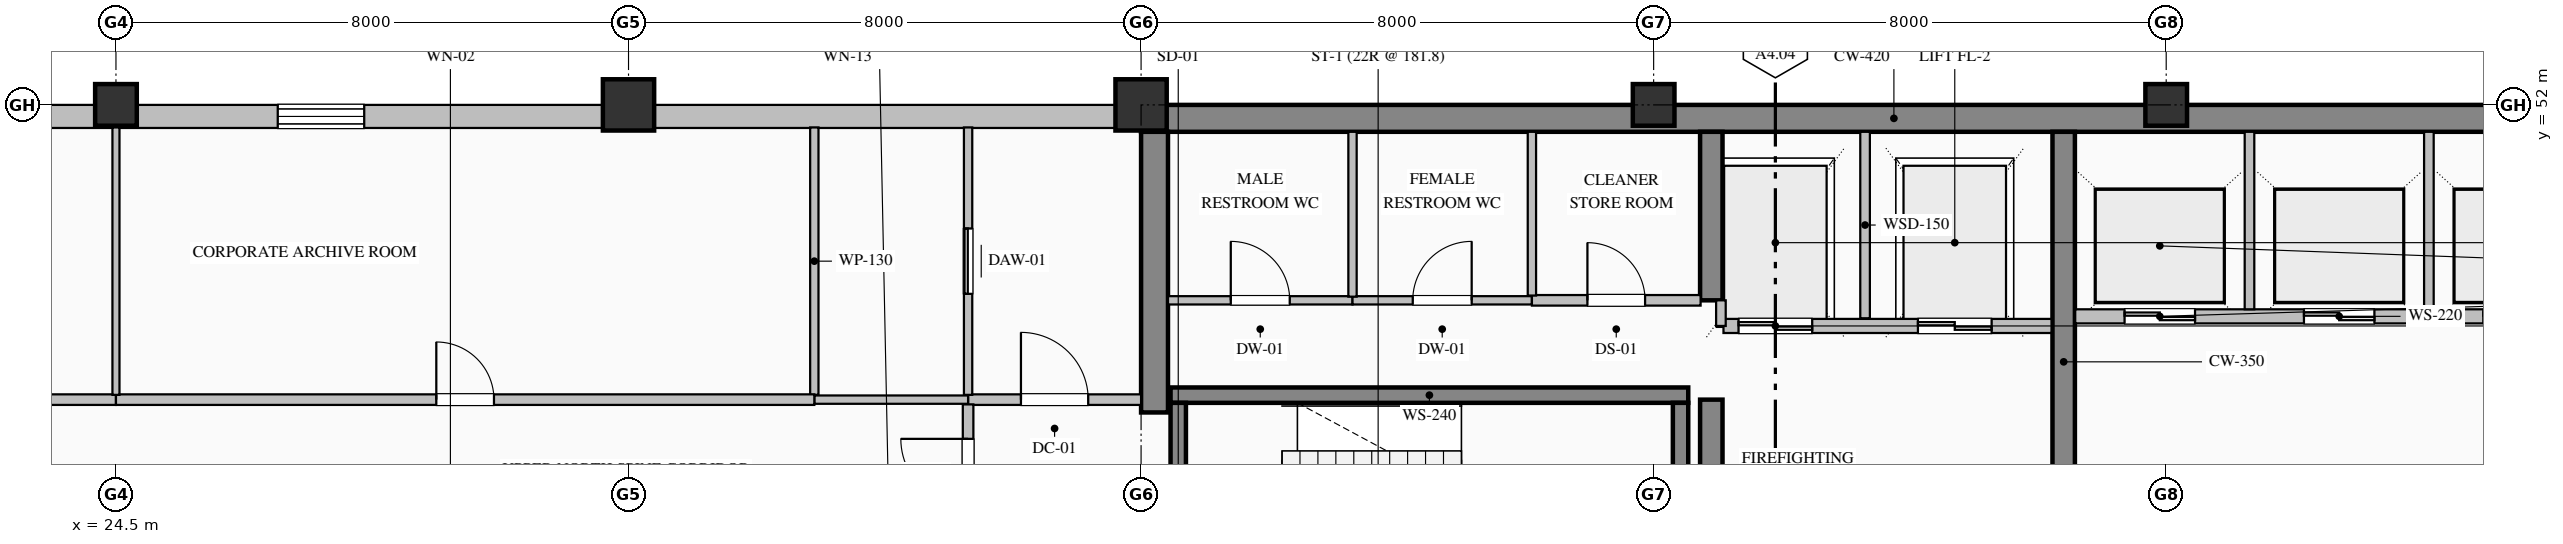
"""IFC4 building model, lengths in metres.
Left out: names, types, materials, properties, quantities, classifications, styles, units other than length and angle.
Written with IfcOpenShell. Run it as: python <this file> out.ifc"""

import sys

from ifc_helpers import new_model, si_unit, direction, frame, frame_2d, origin, origin_2d, place, context, subcontext, project, spatial, rectangle, hollow_rectangle, extrude, element, fill, save


model = new_model("IFC4")
c1 = context("Model", 3, precision=1e-05, world=origin(), true_north=direction((0.0, 1.0)))
c2 = subcontext(c1, "Body", "Model", "MODEL_VIEW")
j1 = project(units=[si_unit("LENGTHUNIT", "METRE"), si_unit("PLANEANGLEUNIT", "RADIAN")], contexts=[c1])
p1 = place(None, origin())
s1 = spatial("IfcSite", under=j1, at=p1, CompositionType="ELEMENT")
p2 = place(p1, origin())
s2 = spatial("IfcBuilding", under=s1, at=p2, CompositionType="ELEMENT")
p3 = place(p2, frame((0.0, 0.0, 319.2)))
s3 = spatial("IfcBuildingStorey", under=s2, at=p3, CompositionType="ELEMENT", Elevation=319.2)
p4 = place(p3, frame((40.5, 51.79, 0.0), z_axis=(0.0, 0.0, 1.0), x_axis=(1.0, 0.0, 0.0)))
e1 = element("IfcWall", 1, at=p4, inside=s3, PredefinedType="SHEAR", context=c2, shape_type="SweptSolid", body=[
    extrude(rectangle(XDim=23.5, YDim=0.42, at=frame_2d((11.75, 0.0))), origin(), (0.0, 0.0, 1.0), 3.785),
])
p5 = place(p3, frame((40.71, 47.2, 0.0), z_axis=(0.0, 0.0, 1.0), x_axis=(0.0, 1.0, 0.0)))
e2 = element("IfcWall", 2, at=p5, inside=s3, PredefinedType="SHEAR", context=c2, shape_type="SweptSolid", body=[
    extrude(rectangle(XDim=4.38, YDim=0.42, at=frame_2d((2.19, 0.0))), origin(), (0.0, 0.0, 1.0), 3.785),
])
p6 = place(p3, frame((49.4, 44.4, 0.0), z_axis=(0.0, 0.0, 1.0), x_axis=(0.0, 1.0, 0.0)))
e3 = element("IfcWall", 3, at=p6, inside=s3, PredefinedType="SHEAR", context=c2, shape_type="SweptSolid", body=[
    extrude(rectangle(XDim=3.0, YDim=0.35, at=frame_2d((1.5, 0.0))), origin(), (0.0, 0.0, 1.0), 3.785),
])
p7 = place(p3, frame((49.4, 48.95, 0.0), z_axis=(0.0, 0.0, 1.0), x_axis=(0.0, 1.0, 0.0)))
e4 = element("IfcWall", 4, at=p7, inside=s3, PredefinedType="SHEAR", context=c2, shape_type="SweptSolid", body=[
    extrude(rectangle(XDim=2.63, YDim=0.35, at=frame_2d((1.315, 0.0))), origin(), (0.0, 0.0, 1.0), 3.785),
])
p8 = place(p3, frame((54.9, 44.4, 0.0), z_axis=(0.0, 0.0, 1.0), x_axis=(0.0, 1.0, 0.0)))
e5 = element("IfcWall", 5, at=p8, inside=s3, PredefinedType="SHEAR", context=c2, shape_type="SweptSolid", body=[
    extrude(rectangle(XDim=7.18, YDim=0.35, at=frame_2d((3.59, 0.0))), origin(), (0.0, 0.0, 1.0), 3.785),
])
p9 = place(p3, frame((24.5, 52.0, 0.0), z_axis=(0.0, 0.0, 1.0), x_axis=(1.0, 0.0, 0.0)))
e6 = element("IfcColumn", 6, at=p9, inside=s3, PredefinedType="COLUMN", context=c2, shape_type="SweptSolid", body=[
    extrude(hollow_rectangle(XDim=0.65, YDim=0.65, WallThickness=0.028, at=origin_2d()), origin(), (0.0, 0.0, 1.0), 4.0),
])
for number, where, z_axis, x_axis in (
    (7, (32.5, 52.0, 0.0), (0.0, 0.0, 1.0), (1.0, 0.0, 0.0)),
    (8, (40.5, 52.0, 0.0), (0.0, 0.0, 1.0), (1.0, 0.0, 0.0)),
):
    element("IfcColumn", number, at=place(p3, frame(where, z_axis=z_axis, x_axis=x_axis)), inside=s3, PredefinedType="COLUMN", context=c2, shape_type="SweptSolid", body=[
        extrude(hollow_rectangle(XDim=0.8, YDim=0.8, WallThickness=0.032, at=origin_2d()), origin(), (0.0, 0.0, 1.0), 4.0),
    ])
for number, where, z_axis, x_axis in (
    (9, (48.5, 52.0, 0.0), (0.0, 0.0, 1.0), (1.0, 0.0, 0.0)),
    (10, (56.5, 52.0, 0.0), (0.0, 0.0, 1.0), (1.0, 0.0, 0.0)),
):
    element("IfcColumn", number, at=place(p3, frame(where, z_axis=z_axis, x_axis=x_axis)), inside=s3, PredefinedType="COLUMN", context=c2, shape_type="SweptSolid", body=[
        extrude(hollow_rectangle(XDim=0.65, YDim=0.65, WallThickness=0.028, at=origin_2d()), origin(), (0.0, 0.0, 1.0), 4.0),
    ])
p10 = place(p3, frame((20.5, 51.82, 0.0), z_axis=(0.0, 0.0, 1.0), x_axis=(1.0, 0.0, 0.0)))
e11 = element("IfcWall", 11, at=p10, inside=s3, PredefinedType="SOLIDWALL", context=c2, shape_type="SweptSolid", body=[
    extrude(rectangle(XDim=20.02, YDim=0.36, at=frame_2d((10.01, 0.0))), origin(), (0.0, 0.0, 1.0), 3.335),
])
p11 = place(p10, frame((6.525, 0.0, 0.9)))
e12 = element("IfcOpeningElement", 12, at=p11, cuts=e11, PredefinedType="OPENING", context=c2, shape_type="SweptSolid", body=[
    extrude(rectangle(XDim=1.35, YDim=1.85, at=frame_2d((0.675, 0.925))), frame((0.0, 0.19, 0.0), z_axis=(0.0, -1.0, 0.0), x_axis=(1.0, 0.0, 0.0)), (0.0, 0.0, 1.0), 0.38),
])
p12 = place(p3, frame((40.96, 47.47, 0.0), z_axis=(0.0, 0.0, 1.0), x_axis=(1.0, 0.0, 0.0)))
e13 = element("IfcWall", 13, at=p12, inside=s3, PredefinedType="SOLIDWALL", context=c2, shape_type="SweptSolid", body=[
    extrude(rectangle(XDim=8.08, YDim=0.24, at=frame_2d((4.04, 0.0))), origin(), (0.0, 0.0, 1.0), 4.0),
])
p13 = place(p3, frame((41.08, 47.35, 0.0), z_axis=(0.0, 0.0, 1.0), x_axis=(0.0, -1.0, 0.0)))
e14 = element("IfcWall", 14, at=p13, inside=s3, PredefinedType="SOLIDWALL", context=c2, shape_type="SweptSolid", body=[
    extrude(rectangle(XDim=3.15, YDim=0.24, at=frame_2d((1.575, 0.0))), origin(), (0.0, 0.0, 1.0), 4.0),
])
p14 = place(p13, frame((1.0, 0.0, 0.0)))
e15 = element("IfcOpeningElement", 15, at=p14, cuts=e14, PredefinedType="OPENING", context=c2, shape_type="SweptSolid", body=[
    extrude(rectangle(XDim=1.15, YDim=2.2, at=frame_2d((0.575, 1.1))), frame((0.0, 0.13, 0.0), z_axis=(0.0, -1.0, 0.0), x_axis=(1.0, 0.0, 0.0)), (0.0, 0.0, 1.0), 0.26),
])
p15 = place(p3, frame((48.92, 44.2, 0.0), z_axis=(0.0, 0.0, 1.0), x_axis=(0.0, 1.0, 0.0)))
e16 = element("IfcWall", 16, at=p15, inside=s3, PredefinedType="SOLIDWALL", context=c2, shape_type="SweptSolid", body=[
    extrude(rectangle(XDim=3.15, YDim=0.24, at=frame_2d((1.575, 0.0))), origin(), (0.0, 0.0, 1.0), 4.0),
])
p16 = place(p3, frame((54.71, 48.55, 0.0), z_axis=(0.0, 0.0, 1.0), x_axis=(-1.0, 0.0, 0.0)))
e17 = element("IfcWall", 17, at=p16, inside=s3, PredefinedType="PARTITIONING", context=c2, shape_type="SweptSolid", body=[
    extrude(rectangle(XDim=5.12, YDim=0.22, at=frame_2d((2.56, 0.0))), origin(), (0.0, 0.0, 1.0), 3.785),
])
p17 = place(p16, frame((3.735, 0.0, 0.0)))
e18 = element("IfcOpeningElement", 18, at=p17, cuts=e17, PredefinedType="OPENING", context=c2, shape_type="SweptSolid", body=[
    extrude(rectangle(XDim=1.15, YDim=2.2, at=frame_2d((0.575, 1.1))), frame((0.0, 0.12, 0.0), z_axis=(0.0, -1.0, 0.0), x_axis=(1.0, 0.0, 0.0)), (0.0, 0.0, 1.0), 0.24),
])
p18 = place(p16, frame((0.935, 0.0, 0.0)))
e19 = element("IfcOpeningElement", 19, at=p18, cuts=e17, PredefinedType="OPENING", context=c2, shape_type="SweptSolid", body=[
    extrude(rectangle(XDim=1.15, YDim=2.2, at=frame_2d((0.575, 1.1))), frame((0.0, 0.12, 0.0), z_axis=(0.0, -1.0, 0.0), x_axis=(1.0, 0.0, 0.0)), (0.0, 0.0, 1.0), 0.24),
])
p19 = place(p3, frame((51.8, 48.67, 0.0), z_axis=(0.0, 0.0, 1.0), x_axis=(0.0, 1.0, 0.0)))
e20 = element("IfcWall", 20, at=p19, inside=s3, PredefinedType="PARTITIONING", context=c2, shape_type="SweptSolid", body=[
    extrude(rectangle(XDim=2.91, YDim=0.15, at=frame_2d((1.455, 0.0))), origin(), (0.0, 0.0, 1.0), 3.785),
])
p20 = place(p3, frame((49.55, 48.55, 0.0), z_axis=(0.0, 0.0, 1.0), x_axis=(0.0, 1.0, 0.0)))
e21 = element("IfcWall", 21, at=p20, inside=s3, PredefinedType="PARTITIONING", context=c2, shape_type="SweptSolid", body=[
    extrude(rectangle(XDim=0.4, YDim=0.15, at=frame_2d((0.2, 0.0))), origin(), (0.0, 0.0, 1.0), 3.785),
])
p21 = place(p3, frame((63.32, 48.7, 0.0), z_axis=(0.0, 0.0, 1.0), x_axis=(-1.0, 0.0, 0.0)))
e22 = element("IfcWall", 22, at=p21, inside=s3, PredefinedType="PARTITIONING", context=c2, shape_type="SweptSolid", body=[
    extrude(rectangle(XDim=8.24, YDim=0.22, at=frame_2d((4.12, 0.0))), origin(), (0.0, 0.0, 1.0), 3.785),
])
p22 = place(p21, frame((6.37, 0.0, 0.0)))
e23 = element("IfcOpeningElement", 23, at=p22, cuts=e22, PredefinedType="OPENING", context=c2, shape_type="SweptSolid", body=[
    extrude(rectangle(XDim=1.1, YDim=2.2, at=frame_2d((0.55, 1.1))), frame((0.0, 0.12, 0.0), z_axis=(0.0, -1.0, 0.0), x_axis=(1.0, 0.0, 0.0)), (0.0, 0.0, 1.0), 0.24),
])
p23 = place(p21, frame((3.57, 0.0, 0.0)))
e24 = element("IfcOpeningElement", 24, at=p23, cuts=e22, PredefinedType="OPENING", context=c2, shape_type="SweptSolid", body=[
    extrude(rectangle(XDim=1.1, YDim=2.2, at=frame_2d((0.55, 1.1))), frame((0.0, 0.12, 0.0), z_axis=(0.0, -1.0, 0.0), x_axis=(1.0, 0.0, 0.0)), (0.0, 0.0, 1.0), 0.24),
])
p24 = place(p21, frame((0.77, 0.0, 0.0)))
e25 = element("IfcOpeningElement", 25, at=p24, cuts=e22, PredefinedType="OPENING", context=c2, shape_type="SweptSolid", body=[
    extrude(rectangle(XDim=1.1, YDim=2.2, at=frame_2d((0.55, 1.1))), frame((0.0, 0.12, 0.0), z_axis=(0.0, -1.0, 0.0), x_axis=(1.0, 0.0, 0.0)), (0.0, 0.0, 1.0), 0.24),
])
for number, where, z_axis, x_axis in (
    (26, (57.8, 48.81, 0.0), (0.0, 0.0, 1.0), (0.0, 1.0, 0.0)),
    (27, (60.6, 48.81, 0.0), (0.0, 0.0, 1.0), (0.0, 1.0, 0.0)),
):
    element("IfcWall", number, at=place(p3, frame(where, z_axis=z_axis, x_axis=x_axis)), inside=s3, PredefinedType="PARTITIONING", context=c2, shape_type="SweptSolid", body=[
        extrude(rectangle(XDim=2.77, YDim=0.15, at=frame_2d((1.385, 0.0))), origin(), (0.0, 0.0, 1.0), 3.785),
    ])
p25 = place(p3, frame((37.8, 47.4, 0.0), z_axis=(0.0, 0.0, 1.0), x_axis=(1.0, 0.0, 0.0)))
e28 = element("IfcWall", 28, at=p25, inside=s3, PredefinedType="PARTITIONING", context=c2, shape_type="SweptSolid", body=[
    extrude(rectangle(XDim=2.7, YDim=0.165, at=frame_2d((1.35, 0.0))), origin(), (0.0, 0.0, 1.0), 3.785),
])
p26 = place(p25, frame((0.825, 0.0, 0.0)))
e29 = element("IfcOpeningElement", 29, at=p26, cuts=e28, PredefinedType="OPENING", context=c2, shape_type="SweptSolid", body=[
    extrude(rectangle(XDim=1.05, YDim=2.15, at=frame_2d((0.525, 1.075))), frame((0.0, 0.093, 0.0), z_axis=(0.0, -1.0, 0.0), x_axis=(1.0, 0.0, 0.0)), (0.0, 0.0, 1.0), 0.185),
])
p27 = place(p3, frame((37.8, 45.2, 0.0), z_axis=(0.0, 0.0, 1.0), x_axis=(0.0, 1.0, 0.0)))
e30 = element("IfcWall", 30, at=p27, inside=s3, PredefinedType="PARTITIONING", context=c2, shape_type="SweptSolid", body=[
    extrude(rectangle(XDim=2.125, YDim=0.165, at=frame_2d((1.063, 0.0))), origin(), (0.0, 0.0, 1.0), 3.785),
])
p28 = place(p27, frame((0.538, 0.0, 0.0)))
e31 = element("IfcOpeningElement", 31, at=p28, cuts=e30, PredefinedType="OPENING", context=c2, shape_type="SweptSolid", body=[
    extrude(rectangle(XDim=1.05, YDim=2.15, at=frame_2d((0.525, 1.075))), frame((0.0, 0.093, 0.0), z_axis=(0.0, -1.0, 0.0), x_axis=(1.0, 0.0, 0.0)), (0.0, 0.0, 1.0), 0.185),
])
p29 = place(p3, frame((37.8, 47.475, 0.0), z_axis=(0.0, 0.0, 1.0), x_axis=(0.0, 1.0, 0.0)))
e32 = element("IfcWall", 32, at=p29, inside=s3, PredefinedType="PARTITIONING", context=c2, shape_type="SweptSolid", body=[
    extrude(rectangle(XDim=4.173, YDim=0.13, at=frame_2d((2.087, 0.0))), origin(), (0.0, 0.0, 1.0), 3.785),
])
p30 = place(p29, frame((1.577, 0.0, 0.0)))
e33 = element("IfcOpeningElement", 33, at=p30, cuts=e32, PredefinedType="OPENING", context=c2, shape_type="SweptSolid", body=[
    extrude(rectangle(XDim=1.02, YDim=2.15, at=frame_2d((0.51, 1.075))), frame((0.0, 0.075, 0.0), z_axis=(0.0, -1.0, 0.0), x_axis=(1.0, 0.0, 0.0)), (0.0, 0.0, 1.0), 0.15),
])
p31 = place(p3, frame((37.8, 47.4, 0.0), z_axis=(0.0, 0.0, 1.0), x_axis=(-1.0, 0.0, 0.0)))
e34 = element("IfcWall", 34, at=p31, inside=s3, PredefinedType="PARTITIONING", context=c2, shape_type="SweptSolid", body=[
    extrude(rectangle(XDim=2.4, YDim=0.13, at=frame_2d((1.2, 0.0))), origin(), (0.0, 0.0, 1.0), 3.785),
])
p32 = place(p3, frame((35.4, 47.475, 0.0), z_axis=(0.0, 0.0, 1.0), x_axis=(0.0, 1.0, 0.0)))
e35 = element("IfcWall", 35, at=p32, inside=s3, PredefinedType="PARTITIONING", context=c2, shape_type="SweptSolid", body=[
    extrude(rectangle(XDim=4.173, YDim=0.13, at=frame_2d((2.087, 0.0))), origin(), (0.0, 0.0, 1.0), 3.785),
])
p33 = place(p3, frame((40.92, 48.95, 0.0), z_axis=(0.0, 0.0, 1.0), x_axis=(1.0, 0.0, 0.0)))
e36 = element("IfcWall", 36, at=p33, inside=s3, PredefinedType="PARTITIONING", context=c2, shape_type="SweptSolid", body=[
    extrude(rectangle(XDim=2.88, YDim=0.13, at=frame_2d((1.44, 0.0))), origin(), (0.0, 0.0, 1.0), 3.785),
])
p34 = place(p33, frame((0.98, 0.0, 0.0)))
e37 = element("IfcOpeningElement", 37, at=p34, cuts=e36, PredefinedType="OPENING", context=c2, shape_type="SweptSolid", body=[
    extrude(rectangle(XDim=0.92, YDim=2.15, at=frame_2d((0.46, 1.075))), frame((0.0, 0.075, 0.0), z_axis=(0.0, -1.0, 0.0), x_axis=(1.0, 0.0, 0.0)), (0.0, 0.0, 1.0), 0.15),
])
p35 = place(p3, frame((43.8, 48.95, 0.0), z_axis=(0.0, 0.0, 1.0), x_axis=(1.0, 0.0, 0.0)))
e38 = element("IfcWall", 38, at=p35, inside=s3, PredefinedType="PARTITIONING", context=c2, shape_type="SweptSolid", body=[
    extrude(rectangle(XDim=2.8, YDim=0.13, at=frame_2d((1.4, 0.0))), origin(), (0.0, 0.0, 1.0), 3.785),
])
p36 = place(p35, frame((0.94, 0.0, 0.0)))
e39 = element("IfcOpeningElement", 39, at=p36, cuts=e38, PredefinedType="OPENING", context=c2, shape_type="SweptSolid", body=[
    extrude(rectangle(XDim=0.92, YDim=2.15, at=frame_2d((0.46, 1.075))), frame((0.0, 0.075, 0.0), z_axis=(0.0, -1.0, 0.0), x_axis=(1.0, 0.0, 0.0)), (0.0, 0.0, 1.0), 0.15),
])
p37 = place(p3, frame((46.6, 48.95, 0.0), z_axis=(0.0, 0.0, 1.0), x_axis=(1.0, 0.0, 0.0)))
e40 = element("IfcWall", 40, at=p37, inside=s3, PredefinedType="PARTITIONING", context=c2, shape_type="SweptSolid", body=[
    extrude(rectangle(XDim=2.633, YDim=0.165, at=frame_2d((1.316, 0.0))), origin(), (0.0, 0.0, 1.0), 3.785),
])
p38 = place(p37, frame((0.866, 0.0, 0.0)))
e41 = element("IfcOpeningElement", 41, at=p38, cuts=e40, PredefinedType="OPENING", context=c2, shape_type="SweptSolid", body=[
    extrude(rectangle(XDim=0.9, YDim=2.15, at=frame_2d((0.45, 1.075))), frame((0.0, 0.093, 0.0), z_axis=(0.0, -1.0, 0.0), x_axis=(1.0, 0.0, 0.0)), (0.0, 0.0, 1.0), 0.185),
])
p39 = place(p3, frame((43.8, 51.58, 0.0), z_axis=(0.0, 0.0, 1.0), x_axis=(0.0, -1.0, 0.0)))
e42 = element("IfcWall", 42, at=p39, inside=s3, PredefinedType="PARTITIONING", context=c2, shape_type="SweptSolid", body=[
    extrude(rectangle(XDim=2.573, YDim=0.13, at=frame_2d((1.287, 0.0))), origin(), (0.0, 0.0, 1.0), 3.785),
])
p40 = place(p3, frame((46.6, 51.58, 0.0), z_axis=(0.0, 0.0, 1.0), x_axis=(0.0, -1.0, 0.0)))
e43 = element("IfcWall", 43, at=p40, inside=s3, PredefinedType="PARTITIONING", context=c2, shape_type="SweptSolid", body=[
    extrude(rectangle(XDim=2.556, YDim=0.13, at=frame_2d((1.278, 0.0))), origin(), (0.0, 0.0, 1.0), 3.785),
])
p41 = place(p3, frame((20.5, 47.4, 0.0), z_axis=(0.0, 0.0, 1.0), x_axis=(1.0, 0.0, 0.0)))
e44 = element("IfcWall", 44, at=p41, inside=s3, PredefinedType="PARTITIONING", context=c2, shape_type="SweptSolid", body=[
    extrude(rectangle(XDim=4.0, YDim=0.165, at=frame_2d((2.0, 0.0))), origin(), (0.0, 0.0, 1.0), 3.785),
])
p42 = place(p3, frame((24.5, 47.4, 0.0), z_axis=(0.0, 0.0, 1.0), x_axis=(1.0, 0.0, 0.0)))
e45 = element("IfcWall", 45, at=p42, inside=s3, PredefinedType="PARTITIONING", context=c2, shape_type="SweptSolid", body=[
    extrude(rectangle(XDim=10.9, YDim=0.165, at=frame_2d((5.45, 0.0))), origin(), (0.0, 0.0, 1.0), 3.785),
])
p43 = place(p42, frame((5.0, 0.0, 0.0)))
e46 = element("IfcOpeningElement", 46, at=p43, cuts=e45, PredefinedType="OPENING", context=c2, shape_type="SweptSolid", body=[
    extrude(rectangle(XDim=0.9, YDim=2.15, at=frame_2d((0.45, 1.075))), frame((0.0, 0.093, 0.0), z_axis=(0.0, -1.0, 0.0), x_axis=(1.0, 0.0, 0.0)), (0.0, 0.0, 1.0), 0.185),
])
p44 = place(p3, frame((24.5, 51.648, 0.0), z_axis=(0.0, 0.0, 1.0), x_axis=(0.0, -1.0, 0.0)))
e47 = element("IfcWall", 47, at=p44, inside=s3, PredefinedType="MOVABLE", context=c2, shape_type="SweptSolid", body=[
    extrude(rectangle(XDim=4.173, YDim=0.11, at=frame_2d((2.087, 0.0))), origin(), (0.0, 0.0, 1.0), 3.177),
])
p45 = place(p11, origin())
e48 = element("IfcWindow", 48, at=p45, inside=s3, PartitioningType="DOUBLE_PANEL_VERTICAL", PredefinedType="WINDOW", context=c2, shape_type="SweptSolid", body=[
    extrude(rectangle(XDim=1.35, YDim=1.85, at=frame_2d((0.675, 0.925))), frame((0.0, 0.15, 0.0), z_axis=(0.0, -1.0, 0.0), x_axis=(1.0, 0.0, 0.0)), (0.0, 0.0, 1.0), 0.06),
])
fill(e12, e48)
p46 = place(p17, origin())
e49 = element("IfcDoor", 49, at=p46, inside=s3, OperationType="DOUBLE_DOOR_SLIDING", PredefinedType="DOOR", context=c2, shape_type="SweptSolid", body=[
    extrude(rectangle(XDim=1.15, YDim=2.2, at=frame_2d((0.575, 1.1))), frame((0.0, 0.025, 0.0), z_axis=(0.0, -1.0, 0.0), x_axis=(1.0, 0.0, 0.0)), (0.0, 0.0, 1.0), 0.05),
])
fill(e18, e49)
p47 = place(p18, origin())
e50 = element("IfcDoor", 50, at=p47, inside=s3, OperationType="DOUBLE_DOOR_SLIDING", PredefinedType="DOOR", context=c2, shape_type="SweptSolid", body=[
    extrude(rectangle(XDim=1.15, YDim=2.2, at=frame_2d((0.575, 1.1))), frame((0.0, 0.025, 0.0), z_axis=(0.0, -1.0, 0.0), x_axis=(1.0, 0.0, 0.0)), (0.0, 0.0, 1.0), 0.05),
])
fill(e19, e50)
p48 = place(p22, origin())
e51 = element("IfcDoor", 51, at=p48, inside=s3, OperationType="DOUBLE_DOOR_SLIDING", PredefinedType="DOOR", context=c2, shape_type="SweptSolid", body=[
    extrude(rectangle(XDim=1.1, YDim=2.2, at=frame_2d((0.55, 1.1))), frame((0.0, 0.025, 0.0), z_axis=(0.0, -1.0, 0.0), x_axis=(1.0, 0.0, 0.0)), (0.0, 0.0, 1.0), 0.05),
])
fill(e23, e51)
p49 = place(p23, origin())
e52 = element("IfcDoor", 52, at=p49, inside=s3, OperationType="DOUBLE_DOOR_SLIDING", PredefinedType="DOOR", context=c2, shape_type="SweptSolid", body=[
    extrude(rectangle(XDim=1.1, YDim=2.2, at=frame_2d((0.55, 1.1))), frame((0.0, 0.025, 0.0), z_axis=(0.0, -1.0, 0.0), x_axis=(1.0, 0.0, 0.0)), (0.0, 0.0, 1.0), 0.05),
])
fill(e24, e52)
p50 = place(p26, origin())
e53 = element("IfcDoor", 53, at=p50, inside=s3, OperationType="SINGLE_SWING_LEFT", PredefinedType="DOOR", context=c2, shape_type="SweptSolid", body=[
    extrude(rectangle(XDim=1.05, YDim=2.15, at=frame_2d((0.525, 1.075))), frame((0.0, 0.025, 0.0), z_axis=(0.0, -1.0, 0.0), x_axis=(1.0, 0.0, 0.0)), (0.0, 0.0, 1.0), 0.05),
])
fill(e29, e53)
p51 = place(p28, origin())
e54 = element("IfcDoor", 54, at=p51, inside=s3, OperationType="SINGLE_SWING_RIGHT", PredefinedType="DOOR", context=c2, shape_type="SweptSolid", body=[
    extrude(rectangle(XDim=1.05, YDim=2.15, at=frame_2d((0.525, 1.075))), frame((0.0, 0.025, 0.0), z_axis=(0.0, -1.0, 0.0), x_axis=(1.0, 0.0, 0.0)), (0.0, 0.0, 1.0), 0.05),
])
fill(e31, e54)
p52 = place(p30, origin())
e55 = element("IfcDoor", 55, at=p52, inside=s3, OperationType="SLIDING_TO_LEFT", PredefinedType="DOOR", context=c2, shape_type="SweptSolid", body=[
    extrude(rectangle(XDim=1.02, YDim=2.15, at=frame_2d((0.51, 1.075))), frame((0.0, 0.025, 0.0), z_axis=(0.0, -1.0, 0.0), x_axis=(1.0, 0.0, 0.0)), (0.0, 0.0, 1.0), 0.05),
])
fill(e33, e55)
p53 = place(p34, origin())
e56 = element("IfcDoor", 56, at=p53, inside=s3, OperationType="SINGLE_SWING_LEFT", PredefinedType="DOOR", context=c2, shape_type="SweptSolid", body=[
    extrude(rectangle(XDim=0.92, YDim=2.15, at=frame_2d((0.46, 1.075))), frame((0.0, 0.025, 0.0), z_axis=(0.0, -1.0, 0.0), x_axis=(1.0, 0.0, 0.0)), (0.0, 0.0, 1.0), 0.05),
])
fill(e37, e56)
p54 = place(p36, origin())
e57 = element("IfcDoor", 57, at=p54, inside=s3, OperationType="SINGLE_SWING_RIGHT", PredefinedType="DOOR", context=c2, shape_type="SweptSolid", body=[
    extrude(rectangle(XDim=0.92, YDim=2.15, at=frame_2d((0.46, 1.075))), frame((0.0, 0.025, 0.0), z_axis=(0.0, -1.0, 0.0), x_axis=(1.0, 0.0, 0.0)), (0.0, 0.0, 1.0), 0.05),
])
fill(e39, e57)
p55 = place(p38, origin())
e58 = element("IfcDoor", 58, at=p55, inside=s3, OperationType="SINGLE_SWING_LEFT", PredefinedType="DOOR", context=c2, shape_type="SweptSolid", body=[
    extrude(rectangle(XDim=0.9, YDim=2.15, at=frame_2d((0.45, 1.075))), frame((0.0, 0.025, 0.0), z_axis=(0.0, -1.0, 0.0), x_axis=(1.0, 0.0, 0.0)), (0.0, 0.0, 1.0), 0.05),
])
fill(e41, e58)
p56 = place(p43, origin())
e59 = element("IfcDoor", 59, at=p56, inside=s3, OperationType="SINGLE_SWING_LEFT", PredefinedType="DOOR", context=c2, shape_type="SweptSolid", body=[
    extrude(rectangle(XDim=0.9, YDim=2.15, at=frame_2d((0.45, 1.075))), frame((0.0, 0.025, 0.0), z_axis=(0.0, -1.0, 0.0), x_axis=(1.0, 0.0, 0.0)), (0.0, 0.0, 1.0), 0.05),
])
fill(e46, e59)
save(model, sys.argv[1])
